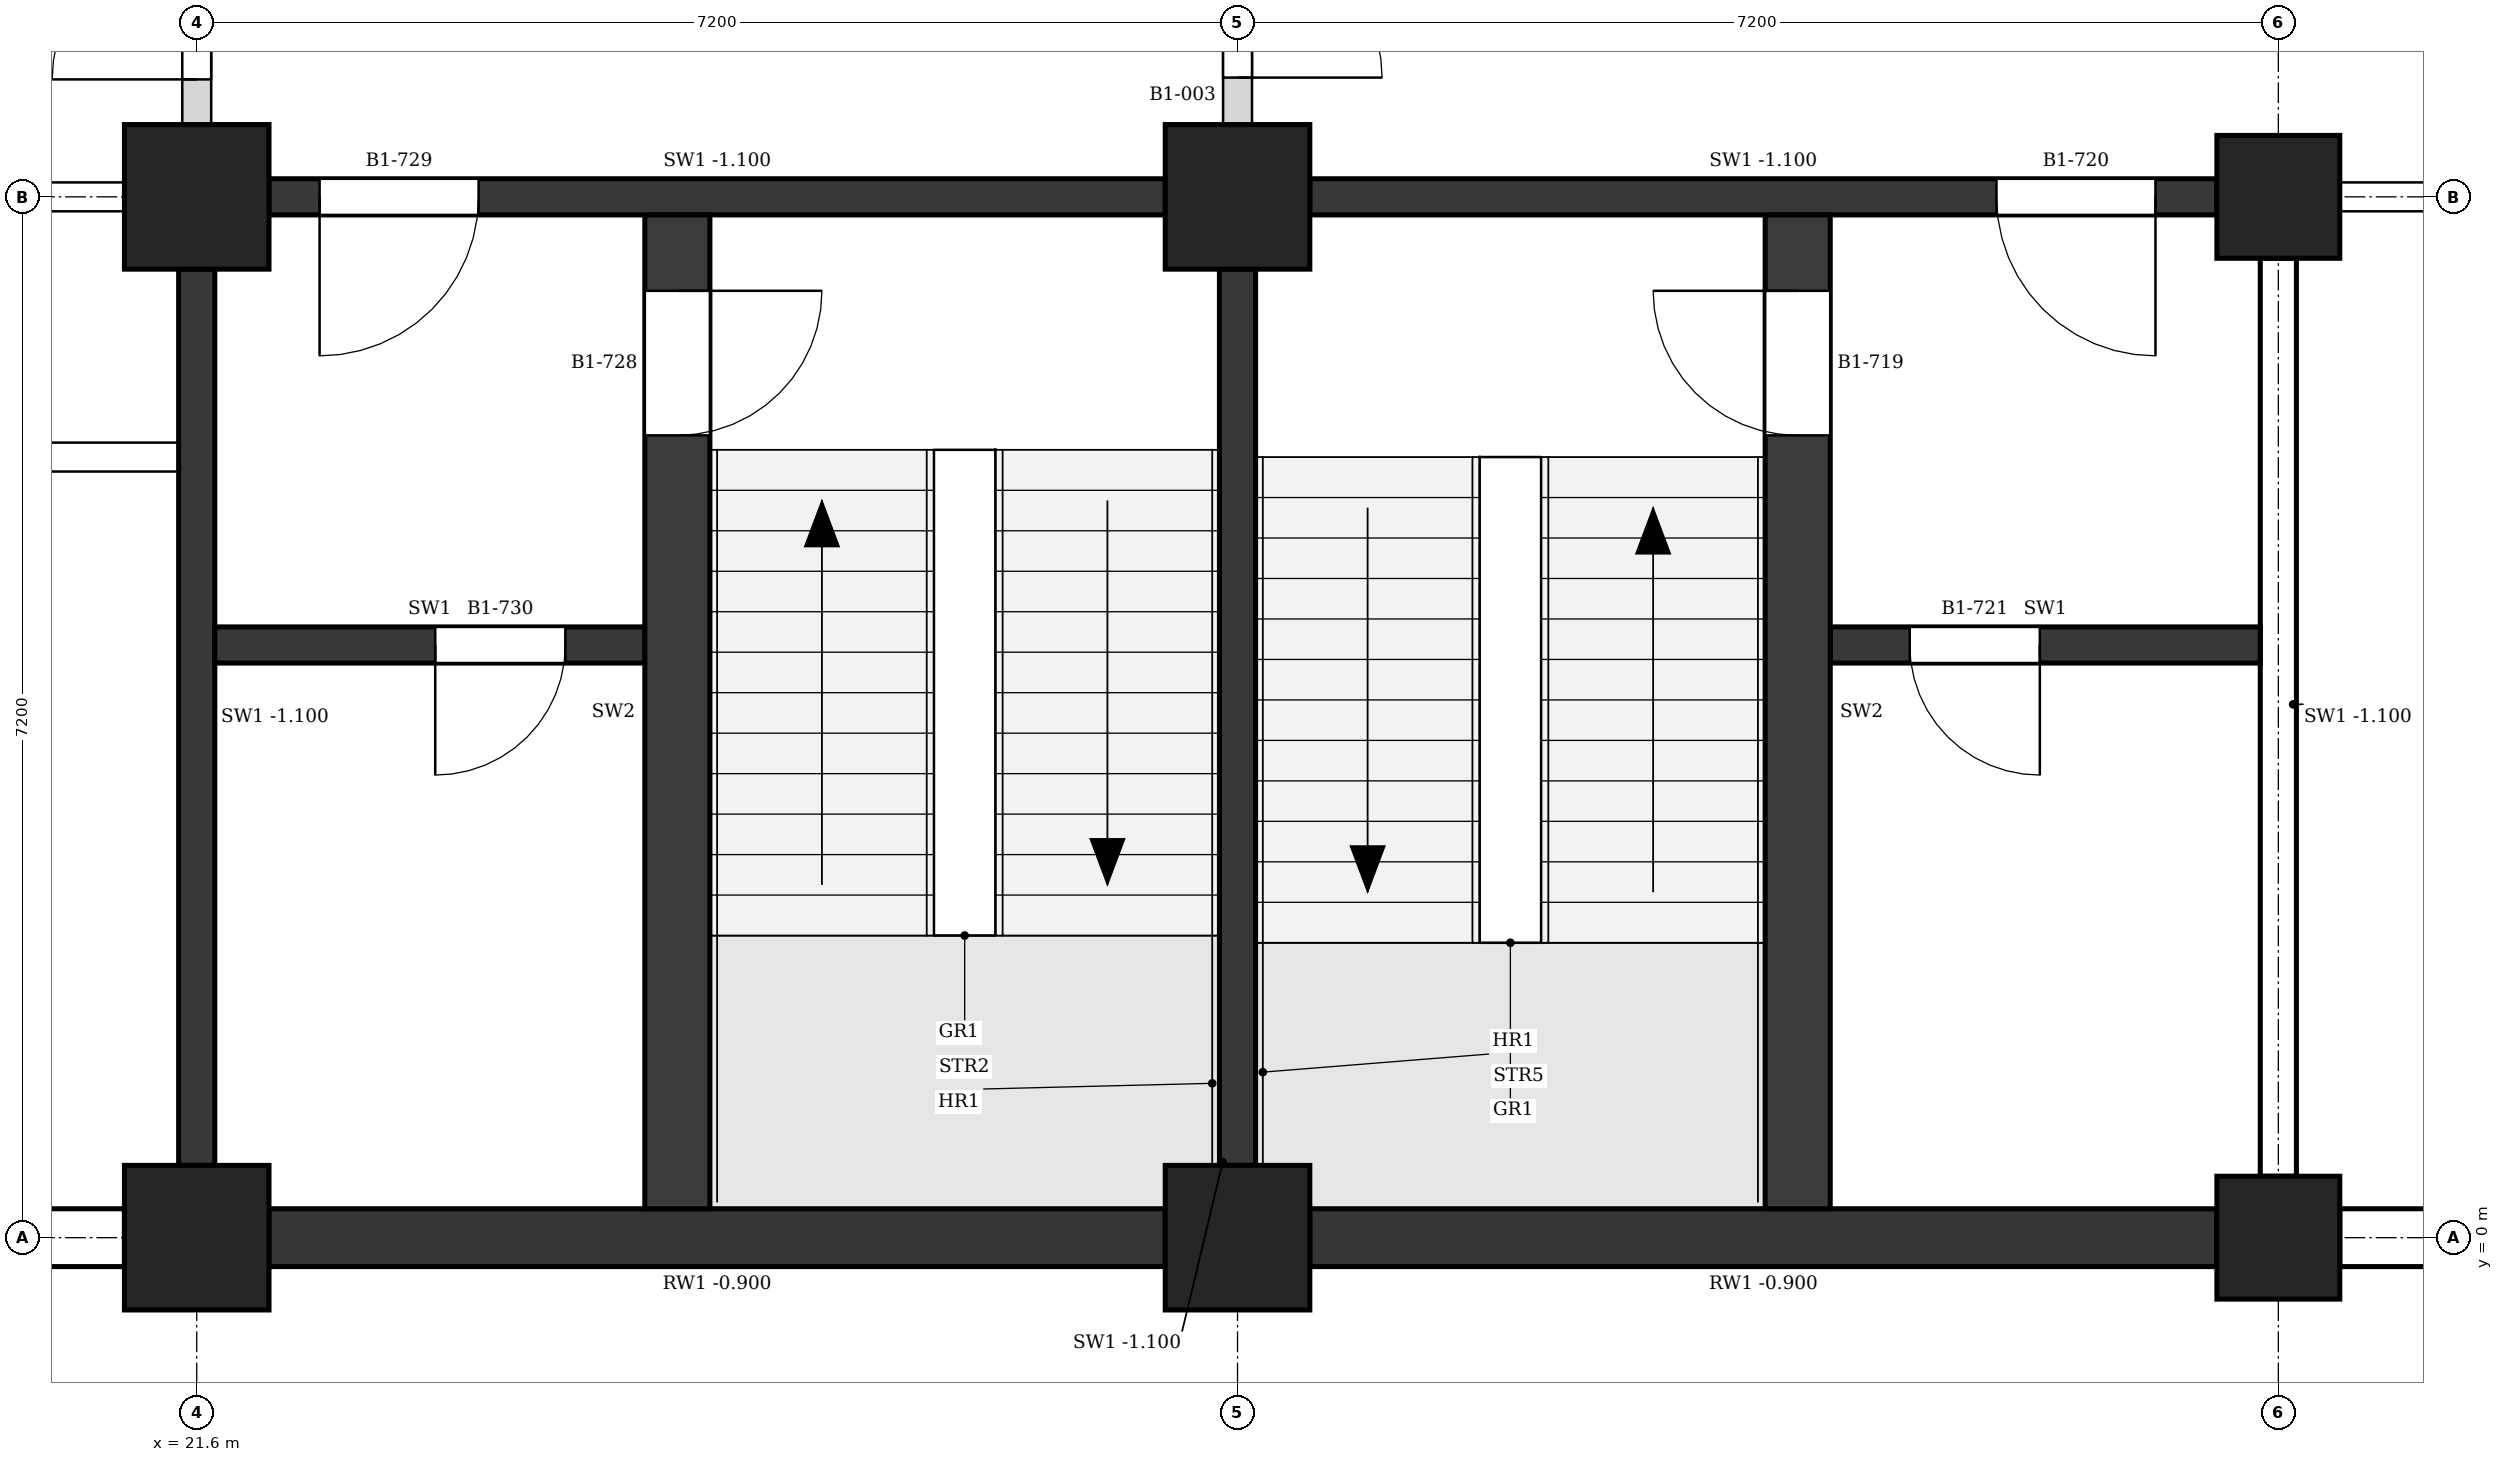
"""IFC4 building model, lengths in metres.
Left out: names, types, materials, properties, quantities, classifications, styles, units other than length and angle.
Written with IfcOpenShell. Run it as: python <this file> out.ifc"""

import sys

from ifc_helpers import new_model, si_unit, direction, frame, frame_2d, origin, origin_2d, place, context, subcontext, project, spatial, polyline, rectangle, outline, extrude, element, fill, save


model = new_model("IFC4")
c1 = context("Model", 3, precision=1e-05, world=origin(), true_north=direction((0.0, 1.0)))
c2 = subcontext(c1, "Body", "Model", "MODEL_VIEW")
j1 = project(units=[si_unit("LENGTHUNIT", "METRE"), si_unit("PLANEANGLEUNIT", "RADIAN")], contexts=[c1])
p1 = place(None, origin())
s1 = spatial("IfcSite", under=j1, at=p1, CompositionType="ELEMENT")
p2 = place(p1, origin())
s2 = spatial("IfcBuilding", under=s1, at=p2, CompositionType="ELEMENT")
p3 = place(p2, frame((0.0, 0.0, -4.5)))
s3 = spatial("IfcBuildingStorey", under=s2, at=p3, CompositionType="ELEMENT", Elevation=-4.5)
for number, where, z_axis, x_axis in (
    (1, (21.6, 0.0, 0.0), (0.0, 0.0, 1.0), (1.0, 0.0, 0.0)),
    (2, (21.6, 7.2, 0.0), (0.0, 0.0, 1.0), (1.0, 0.0, 0.0)),
    (3, (28.8, 0.0, 0.0), (0.0, 0.0, 1.0), (1.0, 0.0, 0.0)),
    (4, (28.8, 7.2, 0.0), (0.0, 0.0, 1.0), (1.0, 0.0, 0.0)),
):
    element("IfcColumn", number, at=place(p3, frame(where, z_axis=z_axis, x_axis=x_axis)), inside=s3, PredefinedType="COLUMN", context=c2, shape_type="SweptSolid", body=[
        extrude(rectangle(XDim=1.0, YDim=1.0, at=origin_2d()), origin(), (0.0, 0.0, 1.0), 4.5),
    ])
for number, where, z_axis, x_axis in (
    (5, (36.0, 0.0, 0.0), (0.0, 0.0, 1.0), (1.0, 0.0, 0.0)),
    (6, (36.0, 7.2, 0.0), (0.0, 0.0, 1.0), (1.0, 0.0, 0.0)),
):
    element("IfcColumn", number, at=place(p3, frame(where, z_axis=z_axis, x_axis=x_axis)), inside=s3, PredefinedType="COLUMN", context=c2, shape_type="SweptSolid", body=[
        extrude(rectangle(XDim=0.85, YDim=0.85, at=origin_2d()), origin(), (0.0, 0.0, 1.0), 4.5),
    ])
p4 = place(p3, frame((14.9, 0.0, 0.0), z_axis=(0.0, 0.0, 1.0), x_axis=(1.0, 0.0, 0.0)))
e7 = element("IfcWall", 7, at=p4, inside=s3, PredefinedType="SOLIDWALL", context=c2, shape_type="SweptSolid", body=[
    extrude(rectangle(XDim=6.2, YDim=0.4, at=frame_2d((3.1, 0.0))), origin(), (0.0, 0.0, 1.0), 3.6),
])
p5 = place(p3, frame((22.1, 0.0, 0.0), z_axis=(0.0, 0.0, 1.0), x_axis=(1.0, 0.0, 0.0)))
e8 = element("IfcWall", 8, at=p5, inside=s3, PredefinedType="SOLIDWALL", context=c2, shape_type="SweptSolid", body=[
    extrude(rectangle(XDim=6.2, YDim=0.4, at=frame_2d((3.1, 0.0))), origin(), (0.0, 0.0, 1.0), 3.6),
])
p6 = place(p3, frame((29.3, 0.0, 0.0), z_axis=(0.0, 0.0, 1.0), x_axis=(1.0, 0.0, 0.0)))
e9 = element("IfcWall", 9, at=p6, inside=s3, PredefinedType="SOLIDWALL", context=c2, shape_type="SweptSolid", body=[
    extrude(rectangle(XDim=6.275, YDim=0.4, at=frame_2d((3.137, 0.0))), origin(), (0.0, 0.0, 1.0), 3.6),
])
p7 = place(p3, frame((36.425, 0.0, 0.0), z_axis=(0.0, 0.0, 1.0), x_axis=(1.0, 0.0, 0.0)))
e10 = element("IfcWall", 10, at=p7, inside=s3, PredefinedType="SOLIDWALL", context=c2, shape_type="SweptSolid", body=[
    extrude(rectangle(XDim=6.35, YDim=0.4, at=frame_2d((3.175, 0.0))), origin(), (0.0, 0.0, 1.0), 3.6),
])
p8 = place(p3, frame((29.3, 7.2, 0.0), z_axis=(0.0, 0.0, 1.0), x_axis=(1.0, 0.0, 0.0)))
e11 = element("IfcWall", 11, at=p8, inside=s3, PredefinedType="SHEAR", context=c2, shape_type="SweptSolid", body=[
    extrude(rectangle(XDim=6.275, YDim=0.25, at=frame_2d((3.137, 0.0))), origin(), (0.0, 0.0, 1.0), 3.4),
])
p9 = place(p8, frame((4.75, 0.0, 0.0)))
e12 = element("IfcOpeningElement", 12, at=p9, cuts=e11, PredefinedType="OPENING", context=c2, shape_type="SweptSolid", body=[
    extrude(rectangle(XDim=1.1, YDim=2.1, at=frame_2d((0.55, 1.05))), frame((0.0, 0.135, 0.0), z_axis=(0.0, -1.0, 0.0), x_axis=(1.0, 0.0, 0.0)), (0.0, 0.0, 1.0), 0.27),
])
p10 = place(p3, frame((28.8, 0.5, 0.0), z_axis=(0.0, 0.0, 1.0), x_axis=(0.0, 1.0, 0.0)))
e13 = element("IfcWall", 13, at=p10, inside=s3, PredefinedType="SHEAR", context=c2, shape_type="SweptSolid", body=[
    extrude(rectangle(XDim=6.2, YDim=0.25, at=frame_2d((3.1, 0.0))), origin(), (0.0, 0.0, 1.0), 3.4),
])
p11 = place(p3, frame((36.0, 0.425, 0.0), z_axis=(0.0, 0.0, 1.0), x_axis=(0.0, 1.0, 0.0)))
e14 = element("IfcWall", 14, at=p11, inside=s3, PredefinedType="SHEAR", context=c2, shape_type="SweptSolid", body=[
    extrude(rectangle(XDim=6.35, YDim=0.25, at=frame_2d((3.175, 0.0))), origin(), (0.0, 0.0, 1.0), 3.4),
])
p12 = place(p3, frame((32.675, 0.2, 0.0), z_axis=(0.0, 0.0, 1.0), x_axis=(0.0, 1.0, 0.0)))
e15 = element("IfcWall", 15, at=p12, inside=s3, PredefinedType="SHEAR", context=c2, shape_type="SweptSolid", body=[
    extrude(rectangle(XDim=6.875, YDim=0.45, at=frame_2d((3.438, 0.0))), origin(), (0.0, 0.0, 1.0), 4.2),
])
p13 = place(p12, frame((5.35, 0.0, 0.0)))
e16 = element("IfcOpeningElement", 16, at=p13, cuts=e15, PredefinedType="OPENING", context=c2, shape_type="SweptSolid", body=[
    extrude(rectangle(XDim=1.0, YDim=2.1, at=frame_2d((0.5, 1.05))), frame((0.0, 0.235, 0.0), z_axis=(0.0, -1.0, 0.0), x_axis=(1.0, 0.0, 0.0)), (0.0, 0.0, 1.0), 0.47),
])
p14 = place(p3, frame((32.9, 4.1, 0.0), z_axis=(0.0, 0.0, 1.0), x_axis=(1.0, 0.0, 0.0)))
e17 = element("IfcWall", 17, at=p14, inside=s3, PredefinedType="SHEAR", context=c2, shape_type="SweptSolid", body=[
    extrude(rectangle(XDim=2.975, YDim=0.25, at=frame_2d((1.488, 0.0))), origin(), (0.0, 0.0, 1.0), 4.2),
])
p15 = place(p14, frame((0.55, 0.0, 0.0)))
e18 = element("IfcOpeningElement", 18, at=p15, cuts=e17, PredefinedType="OPENING", context=c2, shape_type="SweptSolid", body=[
    extrude(rectangle(XDim=0.9, YDim=2.1, at=frame_2d((0.45, 1.05))), frame((0.0, 0.135, 0.0), z_axis=(0.0, -1.0, 0.0), x_axis=(1.0, 0.0, 0.0)), (0.0, 0.0, 1.0), 0.27),
])
p16 = place(p3, frame((22.1, 7.2, 0.0), z_axis=(0.0, 0.0, 1.0), x_axis=(1.0, 0.0, 0.0)))
e19 = element("IfcWall", 19, at=p16, inside=s3, PredefinedType="SHEAR", context=c2, shape_type="SweptSolid", body=[
    extrude(rectangle(XDim=6.2, YDim=0.25, at=frame_2d((3.1, 0.0))), origin(), (0.0, 0.0, 1.0), 3.4),
])
p17 = place(p16, frame((0.35, 0.0, 0.0)))
e20 = element("IfcOpeningElement", 20, at=p17, cuts=e19, PredefinedType="OPENING", context=c2, shape_type="SweptSolid", body=[
    extrude(rectangle(XDim=1.1, YDim=2.1, at=frame_2d((0.55, 1.05))), frame((0.0, 0.135, 0.0), z_axis=(0.0, -1.0, 0.0), x_axis=(1.0, 0.0, 0.0)), (0.0, 0.0, 1.0), 0.27),
])
p18 = place(p3, frame((21.6, 0.5, 0.0), z_axis=(0.0, 0.0, 1.0), x_axis=(0.0, 1.0, 0.0)))
e21 = element("IfcWall", 21, at=p18, inside=s3, PredefinedType="SHEAR", context=c2, shape_type="SweptSolid", body=[
    extrude(rectangle(XDim=6.2, YDim=0.25, at=frame_2d((3.1, 0.0))), origin(), (0.0, 0.0, 1.0), 3.4),
])
p19 = place(p3, frame((24.925, 0.2, 0.0), z_axis=(0.0, 0.0, 1.0), x_axis=(0.0, 1.0, 0.0)))
e22 = element("IfcWall", 22, at=p19, inside=s3, PredefinedType="SHEAR", context=c2, shape_type="SweptSolid", body=[
    extrude(rectangle(XDim=6.875, YDim=0.45, at=frame_2d((3.438, 0.0))), origin(), (0.0, 0.0, 1.0), 4.2),
])
p20 = place(p19, frame((5.35, 0.0, 0.0)))
e23 = element("IfcOpeningElement", 23, at=p20, cuts=e22, PredefinedType="OPENING", context=c2, shape_type="SweptSolid", body=[
    extrude(rectangle(XDim=1.0, YDim=2.1, at=frame_2d((0.5, 1.05))), frame((0.0, 0.235, 0.0), z_axis=(0.0, -1.0, 0.0), x_axis=(1.0, 0.0, 0.0)), (0.0, 0.0, 1.0), 0.47),
])
p21 = place(p3, frame((21.725, 4.1, 0.0), z_axis=(0.0, 0.0, 1.0), x_axis=(1.0, 0.0, 0.0)))
e24 = element("IfcWall", 24, at=p21, inside=s3, PredefinedType="SHEAR", context=c2, shape_type="SweptSolid", body=[
    extrude(rectangle(XDim=2.975, YDim=0.25, at=frame_2d((1.487, 0.0))), origin(), (0.0, 0.0, 1.0), 4.2),
])
p22 = place(p21, frame((1.525, 0.0, 0.0)))
e25 = element("IfcOpeningElement", 25, at=p22, cuts=e24, PredefinedType="OPENING", context=c2, shape_type="SweptSolid", body=[
    extrude(rectangle(XDim=0.9, YDim=2.1, at=frame_2d((0.45, 1.05))), frame((0.0, 0.135, 0.0), z_axis=(0.0, -1.0, 0.0), x_axis=(1.0, 0.0, 0.0)), (0.0, 0.0, 1.0), 0.27),
])
p23 = place(p3, frame((7.325, 5.4, 0.0), z_axis=(0.0, 0.0, 1.0), x_axis=(1.0, 0.0, 0.0)))
e26 = element("IfcWall", 26, at=p23, inside=s3, PredefinedType="PARTITIONING", context=c2, shape_type="SweptSolid", body=[
    extrude(outline(polyline([(0.0, 0.0), (14.15, 0.0), (14.15, 3.4), (13.975, 3.4), (13.975, 4.2), (7.375, 4.2), (7.375, 3.4), (6.775, 3.4), (6.775, 4.2), (0.175, 4.2), (0.175, 3.4), (0.0, 3.4), (0.0, 0.0)])), frame((0.0, 0.1, 0.0), z_axis=(0.0, -1.0, 0.0), x_axis=(1.0, 0.0, 0.0)), (0.0, 0.0, 1.0), 0.2),
])
p24 = place(p23, frame((1.238, 0.0, 0.0)))
e27 = element("IfcOpeningElement", 27, at=p24, cuts=e26, PredefinedType="OPENING", context=c2, shape_type="SweptSolid", body=[
    extrude(rectangle(XDim=1.0, YDim=2.1, at=frame_2d((0.5, 1.05))), frame((0.0, 0.11, 0.0), z_axis=(0.0, -1.0, 0.0), x_axis=(1.0, 0.0, 0.0)), (0.0, 0.0, 1.0), 0.22),
])
p25 = place(p23, frame((4.775, 0.0, 0.0)))
e28 = element("IfcOpeningElement", 28, at=p25, cuts=e26, PredefinedType="OPENING", context=c2, shape_type="SweptSolid", body=[
    extrude(rectangle(XDim=1.0, YDim=2.1, at=frame_2d((0.5, 1.05))), frame((0.0, 0.11, 0.0), z_axis=(0.0, -1.0, 0.0), x_axis=(1.0, 0.0, 0.0)), (0.0, 0.0, 1.0), 0.22),
])
p26 = place(p23, frame((8.375, 0.0, 0.0)))
e29 = element("IfcOpeningElement", 29, at=p26, cuts=e26, PredefinedType="OPENING", context=c2, shape_type="SweptSolid", body=[
    extrude(rectangle(XDim=1.0, YDim=2.1, at=frame_2d((0.5, 1.05))), frame((0.0, 0.11, 0.0), z_axis=(0.0, -1.0, 0.0), x_axis=(1.0, 0.0, 0.0)), (0.0, 0.0, 1.0), 0.22),
])
p27 = place(p23, frame((11.913, 0.0, 0.0)))
e30 = element("IfcOpeningElement", 30, at=p27, cuts=e26, PredefinedType="OPENING", context=c2, shape_type="SweptSolid", body=[
    extrude(rectangle(XDim=1.0, YDim=2.1, at=frame_2d((0.5, 1.05))), frame((0.0, 0.11, 0.0), z_axis=(0.0, -1.0, 0.0), x_axis=(1.0, 0.0, 0.0)), (0.0, 0.0, 1.0), 0.22),
])
p28 = place(p3, frame((14.9, 7.2, 0.0), z_axis=(0.0, 0.0, 1.0), x_axis=(1.0, 0.0, 0.0)))
e31 = element("IfcWall", 31, at=p28, inside=s3, PredefinedType="PARTITIONING", context=c2, shape_type="SweptSolid", body=[
    extrude(rectangle(XDim=6.2, YDim=0.2, at=frame_2d((3.1, 0.0))), origin(), (0.0, 0.0, 1.0), 3.4),
])
p29 = place(p28, frame((2.6, 0.0, 0.0)))
e32 = element("IfcOpeningElement", 32, at=p29, cuts=e31, PredefinedType="OPENING", context=c2, shape_type="SweptSolid", body=[
    extrude(rectangle(XDim=1.0, YDim=2.1, at=frame_2d((0.5, 1.05))), frame((0.0, 0.11, 0.0), z_axis=(0.0, -1.0, 0.0), x_axis=(1.0, 0.0, 0.0)), (0.0, 0.0, 1.0), 0.22),
])
p30 = place(p3, frame((36.425, 7.2, 0.0), z_axis=(0.0, 0.0, 1.0), x_axis=(1.0, 0.0, 0.0)))
e33 = element("IfcWall", 33, at=p30, inside=s3, PredefinedType="PARTITIONING", context=c2, shape_type="SweptSolid", body=[
    extrude(rectangle(XDim=6.35, YDim=0.2, at=frame_2d((3.175, 0.0))), origin(), (0.0, 0.0, 1.0), 3.4),
])
p31 = place(p3, frame((21.6, 7.7, 0.0), z_axis=(0.0, 0.0, 1.0), x_axis=(0.0, 1.0, 0.0)))
e34 = element("IfcWall", 34, at=p31, inside=s3, PredefinedType="PARTITIONING", context=c2, shape_type="SweptSolid", body=[
    extrude(rectangle(XDim=2.625, YDim=0.2, at=frame_2d((1.312, 0.0))), origin(), (0.0, 0.0, 1.0), 3.4),
])
p32 = place(p31, frame((0.312, 0.0, 0.0)))
e35 = element("IfcOpeningElement", 35, at=p32, cuts=e34, PredefinedType="OPENING", context=c2, shape_type="SweptSolid", body=[
    extrude(rectangle(XDim=2.0, YDim=2.4, at=frame_2d((1.0, 1.2))), frame((0.0, 0.11, 0.0), z_axis=(0.0, -1.0, 0.0), x_axis=(1.0, 0.0, 0.0)), (0.0, 0.0, 1.0), 0.22),
])
p33 = place(p3, frame((28.8, 7.7, 0.0), z_axis=(0.0, 0.0, 1.0), x_axis=(0.0, 1.0, 0.0)))
e36 = element("IfcWall", 36, at=p33, inside=s3, PredefinedType="PARTITIONING", context=c2, shape_type="SweptSolid", body=[
    extrude(rectangle(XDim=2.65, YDim=0.2, at=frame_2d((1.325, 0.0))), origin(), (0.0, 0.0, 1.0), 3.4),
])
p34 = place(p33, frame((0.325, 0.0, 0.0)))
e37 = element("IfcOpeningElement", 37, at=p34, cuts=e36, PredefinedType="OPENING", context=c2, shape_type="SweptSolid", body=[
    extrude(rectangle(XDim=2.0, YDim=2.4, at=frame_2d((1.0, 1.2))), frame((0.0, 0.11, 0.0), z_axis=(0.0, -1.0, 0.0), x_axis=(1.0, 0.0, 0.0)), (0.0, 0.0, 1.0), 0.22),
])
p35 = place(p13, origin())
e38 = element("IfcDoor", 38, at=p35, inside=s3, OperationType="SINGLE_SWING_RIGHT", PredefinedType="DOOR", context=c2, shape_type="SweptSolid", body=[
    extrude(rectangle(XDim=1.0, YDim=2.1, at=frame_2d((0.5, 1.05))), frame((0.0, 0.025, 0.0), z_axis=(0.0, -1.0, 0.0), x_axis=(1.0, 0.0, 0.0)), (0.0, 0.0, 1.0), 0.05),
])
fill(e16, e38)
p36 = place(p9, frame((1.1, 0.0, 0.0), z_axis=(0.0, 0.0, 1.0), x_axis=(-1.0, 0.0, 0.0)))
e39 = element("IfcDoor", 39, at=p36, inside=s3, OperationType="SINGLE_SWING_LEFT", PredefinedType="DOOR", context=c2, shape_type="SweptSolid", body=[
    extrude(rectangle(XDim=1.1, YDim=2.1, at=frame_2d((0.55, 1.05))), frame((0.0, 0.025, 0.0), z_axis=(0.0, -1.0, 0.0), x_axis=(1.0, 0.0, 0.0)), (0.0, 0.0, 1.0), 0.05),
])
fill(e12, e39)
p37 = place(p15, frame((0.9, 0.0, 0.0), z_axis=(0.0, 0.0, 1.0), x_axis=(-1.0, 0.0, 0.0)))
e40 = element("IfcDoor", 40, at=p37, inside=s3, OperationType="SINGLE_SWING_LEFT", PredefinedType="DOOR", context=c2, shape_type="SweptSolid", body=[
    extrude(rectangle(XDim=0.9, YDim=2.1, at=frame_2d((0.45, 1.05))), frame((0.0, 0.025, 0.0), z_axis=(0.0, -1.0, 0.0), x_axis=(1.0, 0.0, 0.0)), (0.0, 0.0, 1.0), 0.05),
])
fill(e18, e40)
p38 = place(p20, frame((1.0, 0.0, 0.0), z_axis=(0.0, 0.0, 1.0), x_axis=(-1.0, 0.0, 0.0)))
e41 = element("IfcDoor", 41, at=p38, inside=s3, OperationType="SINGLE_SWING_LEFT", PredefinedType="DOOR", context=c2, shape_type="SweptSolid", body=[
    extrude(rectangle(XDim=1.0, YDim=2.1, at=frame_2d((0.5, 1.05))), frame((0.0, 0.025, 0.0), z_axis=(0.0, -1.0, 0.0), x_axis=(1.0, 0.0, 0.0)), (0.0, 0.0, 1.0), 0.05),
])
fill(e23, e41)
p39 = place(p17, frame((1.1, 0.0, 0.0), z_axis=(0.0, 0.0, 1.0), x_axis=(-1.0, 0.0, 0.0)))
e42 = element("IfcDoor", 42, at=p39, inside=s3, OperationType="SINGLE_SWING_RIGHT", PredefinedType="DOOR", context=c2, shape_type="SweptSolid", body=[
    extrude(rectangle(XDim=1.1, YDim=2.1, at=frame_2d((0.55, 1.05))), frame((0.0, 0.025, 0.0), z_axis=(0.0, -1.0, 0.0), x_axis=(1.0, 0.0, 0.0)), (0.0, 0.0, 1.0), 0.05),
])
fill(e20, e42)
p40 = place(p22, frame((0.9, 0.0, 0.0), z_axis=(0.0, 0.0, 1.0), x_axis=(-1.0, 0.0, 0.0)))
e43 = element("IfcDoor", 43, at=p40, inside=s3, OperationType="SINGLE_SWING_RIGHT", PredefinedType="DOOR", context=c2, shape_type="SweptSolid", body=[
    extrude(rectangle(XDim=0.9, YDim=2.1, at=frame_2d((0.45, 1.05))), frame((0.0, 0.025, 0.0), z_axis=(0.0, -1.0, 0.0), x_axis=(1.0, 0.0, 0.0)), (0.0, 0.0, 1.0), 0.05),
])
fill(e25, e43)
p41 = place(p32, origin())
e44 = element("IfcDoor", 44, at=p41, inside=s3, OperationType="DOUBLE_DOOR_SINGLE_SWING", PredefinedType="DOOR", context=c2, shape_type="SweptSolid", body=[
    extrude(rectangle(XDim=2.0, YDim=2.4, at=frame_2d((1.0, 1.2))), frame((0.0, 0.025, 0.0), z_axis=(0.0, -1.0, 0.0), x_axis=(1.0, 0.0, 0.0)), (0.0, 0.0, 1.0), 0.05),
])
fill(e35, e44)
p42 = place(p34, origin())
e45 = element("IfcDoor", 45, at=p42, inside=s3, OperationType="DOUBLE_DOOR_SINGLE_SWING", PredefinedType="DOOR", context=c2, shape_type="SweptSolid", body=[
    extrude(rectangle(XDim=2.0, YDim=2.4, at=frame_2d((1.0, 1.2))), frame((0.0, 0.025, 0.0), z_axis=(0.0, -1.0, 0.0), x_axis=(1.0, 0.0, 0.0)), (0.0, 0.0, 1.0), 0.05),
])
fill(e37, e45)
save(model, sys.argv[1])
